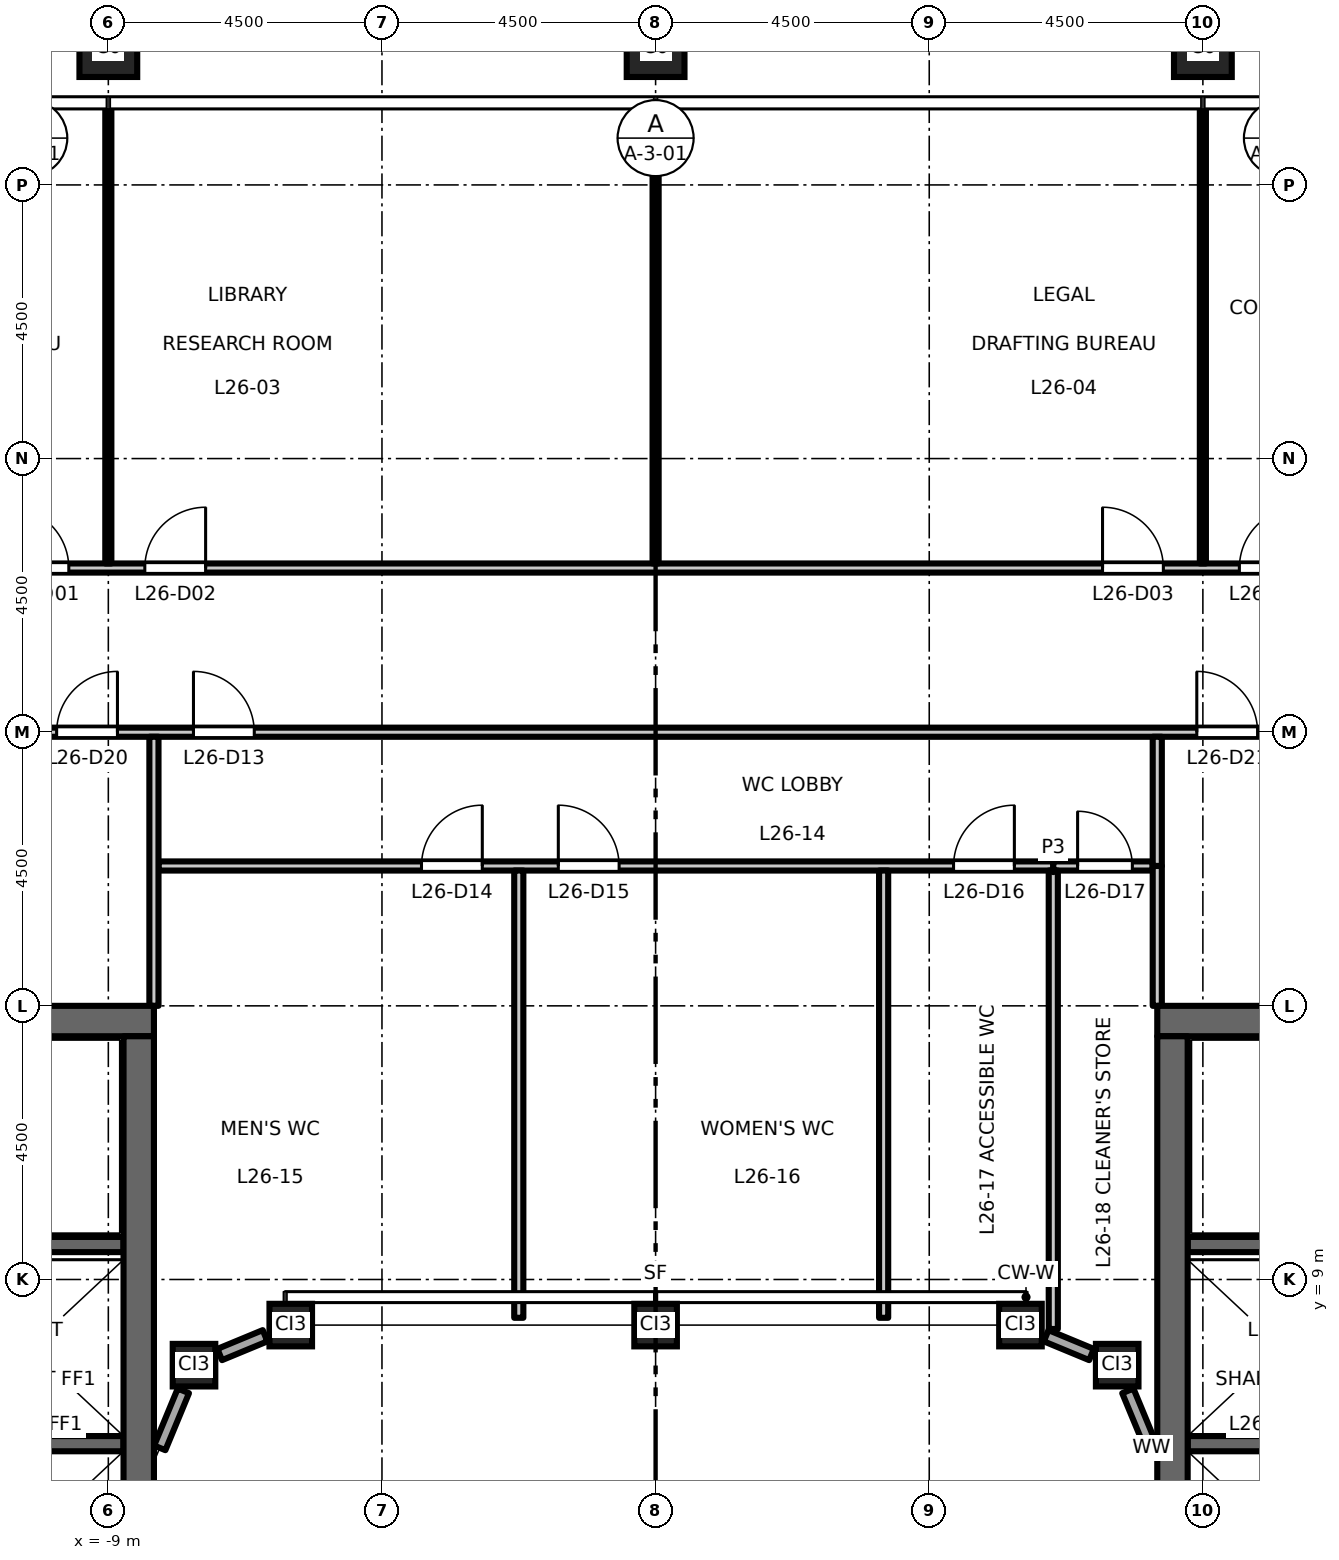
"""IFC4 building model, lengths in metres.
Left out: names, types, materials, properties, quantities, classifications, styles, units other than length and angle.
Written with IfcOpenShell. Run it as: python <this file> out.ifc"""

import sys

from ifc_helpers import new_model, si_unit, direction, frame, frame_2d, origin, origin_2d, place, context, subcontext, project, spatial, rectangle, hollow_rectangle, extrude, element, fill, save


model = new_model("IFC4")
c1 = context("Model", 3, precision=1e-05, world=origin(), true_north=direction((0.0, 1.0)))
c2 = subcontext(c1, "Body", "Model", "MODEL_VIEW")
j1 = project(units=[si_unit("LENGTHUNIT", "METRE"), si_unit("PLANEANGLEUNIT", "RADIAN")], contexts=[c1])
p1 = place(None, origin())
s1 = spatial("IfcSite", under=j1, at=p1, CompositionType="ELEMENT")
p2 = place(p1, origin())
s2 = spatial("IfcBuilding", under=s1, at=p2, CompositionType="ELEMENT")
p3 = place(p2, frame((0.0, 0.0, 122.7)))
s3 = spatial("IfcBuildingStorey", under=s2, at=p3, CompositionType="ELEMENT", Elevation=122.7)
for number, where, z_axis, x_axis in (
    (1, (9.0, 29.25, 0.0), (0.0, 0.0, 1.0), (1.0, 0.0, 0.0)),
    (2, (0.0, 29.25, 0.0), (0.0, 0.0, 1.0), (1.0, 0.0, 0.0)),
    (3, (-9.0, 29.25, 0.0), (0.0, 0.0, 1.0), (1.0, 0.0, 0.0)),
):
    element("IfcColumn", number, at=place(p3, frame(where, z_axis=z_axis, x_axis=x_axis)), inside=s3, PredefinedType="COLUMN", context=c2, shape_type="SweptSolid", body=[
        extrude(hollow_rectangle(XDim=0.95, YDim=0.95, WallThickness=0.055, at=origin_2d()), origin(), (0.0, 0.0, 1.0), 4.5),
    ])
for number, where, z_axis, x_axis in (
    (4, (-7.591, 7.591, 0.0), (0.0, 0.0, 1.0), (1.0, 0.0, 0.0)),
    (5, (-6.0, 8.25, 0.0), (0.0, 0.0, 1.0), (1.0, 0.0, 0.0)),
    (6, (0.0, 8.25, 0.0), (0.0, 0.0, 1.0), (1.0, 0.0, 0.0)),
    (7, (6.0, 8.25, 0.0), (0.0, 0.0, 1.0), (1.0, 0.0, 0.0)),
    (8, (7.591, 7.591, 0.0), (0.0, 0.0, 1.0), (1.0, 0.0, 0.0)),
):
    element("IfcColumn", number, at=place(p3, frame(where, z_axis=z_axis, x_axis=x_axis)), inside=s3, PredefinedType="COLUMN", context=c2, shape_type="SweptSolid", body=[
        extrude(hollow_rectangle(XDim=0.7, YDim=0.7, WallThickness=0.04, at=origin_2d()), origin(), (0.0, 0.0, 1.0), 4.5),
    ])
p4 = place(p3, frame((-8.75, 6.3, 0.0), z_axis=(0.0, 0.0, 1.0), x_axis=(-1.0, 0.0, 0.0)))
e9 = element("IfcWall", 9, at=p4, inside=s3, PredefinedType="SHEAR", context=c2, shape_type="SweptSolid", body=[
    extrude(rectangle(XDim=3.1, YDim=0.25, at=frame_2d((1.55, 0.0))), origin(), (0.0, 0.0, 1.0), 4.35),
])
p5 = place(p3, frame((-8.75, 9.575, 0.0), z_axis=(0.0, 0.0, 1.0), x_axis=(-1.0, 0.0, 0.0)))
e10 = element("IfcWall", 10, at=p5, inside=s3, PredefinedType="SHEAR", context=c2, shape_type="SweptSolid", body=[
    extrude(rectangle(XDim=8.0, YDim=0.25, at=frame_2d((4.0, 0.0))), origin(), (0.0, 0.0, 1.0), 4.35),
])
p6 = place(p5, frame((6.65, 0.0, 0.0)))
e11 = element("IfcOpeningElement", 11, at=p6, cuts=e10, PredefinedType="OPENING", context=c2, shape_type="SweptSolid", body=[
    extrude(rectangle(XDim=1.1, YDim=2.1, at=frame_2d((0.55, 1.05))), frame((0.0, 0.135, 0.0), z_axis=(0.0, -1.0, 0.0), x_axis=(1.0, 0.0, 0.0)), (0.0, 0.0, 1.0), 0.27),
])
p7 = place(p3, frame((-8.25, 13.25, 0.0), z_axis=(0.0, 0.0, 1.0), x_axis=(-1.0, 0.0, 0.0)))
e12 = element("IfcWall", 12, at=p7, inside=s3, PredefinedType="SHEAR", context=c2, shape_type="SweptSolid", body=[
    extrude(rectangle(XDim=13.5, YDim=0.5, at=frame_2d((6.75, 0.0))), origin(), (0.0, 0.0, 1.0), 4.35),
])
p8 = place(p3, frame((-8.5, -13.0, 0.0), z_axis=(0.0, 0.0, 1.0), x_axis=(0.0, 1.0, 0.0)))
e13 = element("IfcWall", 13, at=p8, inside=s3, PredefinedType="SHEAR", context=c2, shape_type="SweptSolid", body=[
    extrude(rectangle(XDim=26.0, YDim=0.5, at=frame_2d((13.0, 0.0))), origin(), (0.0, 0.0, 1.0), 4.35),
])
p9 = place(p3, frame((8.75, 6.3, 0.0), z_axis=(0.0, 0.0, 1.0), x_axis=(1.0, 0.0, 0.0)))
e14 = element("IfcWall", 14, at=p9, inside=s3, PredefinedType="SHEAR", context=c2, shape_type="SweptSolid", body=[
    extrude(rectangle(XDim=3.1, YDim=0.25, at=frame_2d((1.55, 0.0))), origin(), (0.0, 0.0, 1.0), 4.35),
])
p10 = place(p3, frame((8.75, 9.575, 0.0), z_axis=(0.0, 0.0, 1.0), x_axis=(1.0, 0.0, 0.0)))
e15 = element("IfcWall", 15, at=p10, inside=s3, PredefinedType="SHEAR", context=c2, shape_type="SweptSolid", body=[
    extrude(rectangle(XDim=8.0, YDim=0.25, at=frame_2d((4.0, 0.0))), origin(), (0.0, 0.0, 1.0), 4.35),
])
p11 = place(p10, frame((6.65, 0.0, 0.0)))
e16 = element("IfcOpeningElement", 16, at=p11, cuts=e15, PredefinedType="OPENING", context=c2, shape_type="SweptSolid", body=[
    extrude(rectangle(XDim=1.1, YDim=2.1, at=frame_2d((0.55, 1.05))), frame((0.0, 0.135, 0.0), z_axis=(0.0, -1.0, 0.0), x_axis=(1.0, 0.0, 0.0)), (0.0, 0.0, 1.0), 0.27),
])
p12 = place(p3, frame((8.25, 13.25, 0.0), z_axis=(0.0, 0.0, 1.0), x_axis=(1.0, 0.0, 0.0)))
e17 = element("IfcWall", 17, at=p12, inside=s3, PredefinedType="SHEAR", context=c2, shape_type="SweptSolid", body=[
    extrude(rectangle(XDim=13.5, YDim=0.5, at=frame_2d((6.75, 0.0))), origin(), (0.0, 0.0, 1.0), 4.35),
])
p13 = place(p3, frame((8.5, -13.0, 0.0), z_axis=(0.0, 0.0, 1.0), x_axis=(0.0, 1.0, 0.0)))
e18 = element("IfcWall", 18, at=p13, inside=s3, PredefinedType="SHEAR", context=c2, shape_type="SweptSolid", body=[
    extrude(rectangle(XDim=26.0, YDim=0.5, at=frame_2d((13.0, 0.0))), origin(), (0.0, 0.0, 1.0), 4.35),
])
p14 = place(p3, frame((8.154, 6.231, 0.0), z_axis=(0.0, 0.0, 1.0), x_axis=(-0.382769662028, 0.923843810301, 0.0)))
e19 = element("IfcWall", 19, at=p14, inside=s3, PredefinedType="STANDARD", context=c2, shape_type="SweptSolid", body=[
    extrude(rectangle(XDim=1.015, YDim=0.2, at=frame_2d((0.507, 0.0))), origin(), (0.0, 0.0, 1.0), 3.826),
])
for number, where, z_axis, x_axis in (
    (20, (7.168, 7.766, 0.0), (0.0, 0.0, 1.0), (-0.924, 0.383, 0.0)),
    (21, (-6.423, 8.075, 0.0), (0.0, 0.0, 1.0), (-0.924, -0.383, 0.0)),
):
    element("IfcWall", number, at=place(p3, frame(where, z_axis=z_axis, x_axis=x_axis)), inside=s3, PredefinedType="STANDARD", context=c2, shape_type="SweptSolid", body=[
        extrude(rectangle(XDim=0.807, YDim=0.2, at=frame_2d((0.404, 0.0))), origin(), (0.0, 0.0, 1.0), 3.826),
    ])
p15 = place(p3, frame((-7.766, 7.168, 0.0), z_axis=(0.0, 0.0, 1.0), x_axis=(-0.382769662028, -0.923843810301, 0.0)))
e22 = element("IfcWall", 22, at=p15, inside=s3, PredefinedType="STANDARD", context=c2, shape_type="SweptSolid", body=[
    extrude(rectangle(XDim=1.015, YDim=0.2, at=frame_2d((0.507, 0.0))), origin(), (0.0, 0.0, 1.0), 3.826),
])
p16 = place(p3, frame((-8.175, 15.8, 0.0), z_axis=(0.0, 0.0, 1.0), x_axis=(1.0, 0.0, 0.0)))
e23 = element("IfcWall", 23, at=p16, inside=s3, PredefinedType="PARTITIONING", context=c2, shape_type="SweptSolid", body=[
    extrude(rectangle(XDim=14.715, YDim=0.15, at=frame_2d((7.357, 0.0))), origin(), (0.0, 0.0, 1.0), 4.35),
])
p17 = place(p16, frame((4.325, 0.0, 0.0)))
e24 = element("IfcOpeningElement", 24, at=p17, cuts=e23, PredefinedType="OPENING", context=c2, shape_type="SweptSolid", body=[
    extrude(rectangle(XDim=1.0, YDim=2.1, at=frame_2d((0.5, 1.05))), frame((0.0, 0.085, 0.0), z_axis=(0.0, -1.0, 0.0), x_axis=(1.0, 0.0, 0.0)), (0.0, 0.0, 1.0), 0.17),
])
p18 = place(p16, frame((6.575, 0.0, 0.0)))
e25 = element("IfcOpeningElement", 25, at=p18, cuts=e23, PredefinedType="OPENING", context=c2, shape_type="SweptSolid", body=[
    extrude(rectangle(XDim=1.0, YDim=2.1, at=frame_2d((0.5, 1.05))), frame((0.0, 0.085, 0.0), z_axis=(0.0, -1.0, 0.0), x_axis=(1.0, 0.0, 0.0)), (0.0, 0.0, 1.0), 0.17),
])
p19 = place(p16, frame((13.075, 0.0, 0.0)))
e26 = element("IfcOpeningElement", 26, at=p19, cuts=e23, PredefinedType="OPENING", context=c2, shape_type="SweptSolid", body=[
    extrude(rectangle(XDim=1.0, YDim=2.1, at=frame_2d((0.5, 1.05))), frame((0.0, 0.085, 0.0), z_axis=(0.0, -1.0, 0.0), x_axis=(1.0, 0.0, 0.0)), (0.0, 0.0, 1.0), 0.17),
])
p20 = place(p3, frame((6.54, 15.8, 0.0), z_axis=(0.0, 0.0, 1.0), x_axis=(1.0, 0.0, 0.0)))
e27 = element("IfcWall", 27, at=p20, inside=s3, PredefinedType="PARTITIONING", context=c2, shape_type="SweptSolid", body=[
    extrude(rectangle(XDim=1.635, YDim=0.15, at=frame_2d((0.817, 0.0))), origin(), (0.0, 0.0, 1.0), 4.35),
])
p21 = place(p20, frame((0.4, 0.0, 0.0)))
e28 = element("IfcOpeningElement", 28, at=p21, cuts=e27, PredefinedType="OPENING", context=c2, shape_type="SweptSolid", body=[
    extrude(rectangle(XDim=0.9, YDim=2.1, at=frame_2d((0.45, 1.05))), frame((0.0, 0.085, 0.0), z_axis=(0.0, -1.0, 0.0), x_axis=(1.0, 0.0, 0.0)), (0.0, 0.0, 1.0), 0.17),
])
p22 = place(p3, frame((-21.825, 18.0, 0.0), z_axis=(0.0, 0.0, 1.0), x_axis=(1.0, 0.0, 0.0)))
e29 = element("IfcWall", 29, at=p22, inside=s3, PredefinedType="PARTITIONING", context=c2, shape_type="SweptSolid", body=[
    extrude(rectangle(XDim=43.65, YDim=0.15, at=frame_2d((21.825, 0.0))), origin(), (0.0, 0.0, 1.0), 4.35),
])
p23 = place(p22, frame((14.225, 0.0, 0.0)))
e30 = element("IfcOpeningElement", 30, at=p23, cuts=e29, PredefinedType="OPENING", context=c2, shape_type="SweptSolid", body=[
    extrude(rectangle(XDim=1.0, YDim=2.1, at=frame_2d((0.5, 1.05))), frame((0.0, 0.085, 0.0), z_axis=(0.0, -1.0, 0.0), x_axis=(1.0, 0.0, 0.0)), (0.0, 0.0, 1.0), 0.17),
])
p24 = place(p22, frame((11.975, 0.0, 0.0)))
e31 = element("IfcOpeningElement", 31, at=p24, cuts=e29, PredefinedType="OPENING", context=c2, shape_type="SweptSolid", body=[
    extrude(rectangle(XDim=1.0, YDim=2.1, at=frame_2d((0.5, 1.05))), frame((0.0, 0.085, 0.0), z_axis=(0.0, -1.0, 0.0), x_axis=(1.0, 0.0, 0.0)), (0.0, 0.0, 1.0), 0.17),
])
p25 = place(p22, frame((30.725, 0.0, 0.0)))
e32 = element("IfcOpeningElement", 32, at=p25, cuts=e29, PredefinedType="OPENING", context=c2, shape_type="SweptSolid", body=[
    extrude(rectangle(XDim=1.0, YDim=2.1, at=frame_2d((0.5, 1.05))), frame((0.0, 0.085, 0.0), z_axis=(0.0, -1.0, 0.0), x_axis=(1.0, 0.0, 0.0)), (0.0, 0.0, 1.0), 0.17),
])
p26 = place(p3, frame((-27.06, 20.7, 0.0), z_axis=(0.0, 0.0, 1.0), x_axis=(1.0, 0.0, 0.0)))
e33 = element("IfcWall", 33, at=p26, inside=s3, PredefinedType="PARTITIONING", context=c2, shape_type="SweptSolid", body=[
    extrude(rectangle(XDim=54.12, YDim=0.15, at=frame_2d((27.06, 0.0))), origin(), (0.0, 0.0, 1.0), 4.35),
])
p27 = place(p26, frame((16.41, 0.0, 0.0)))
e34 = element("IfcOpeningElement", 34, at=p27, cuts=e33, PredefinedType="OPENING", context=c2, shape_type="SweptSolid", body=[
    extrude(rectangle(XDim=1.0, YDim=2.1, at=frame_2d((0.5, 1.05))), frame((0.0, 0.085, 0.0), z_axis=(0.0, -1.0, 0.0), x_axis=(1.0, 0.0, 0.0)), (0.0, 0.0, 1.0), 0.17),
])
p28 = place(p26, frame((18.66, 0.0, 0.0)))
e35 = element("IfcOpeningElement", 35, at=p28, cuts=e33, PredefinedType="OPENING", context=c2, shape_type="SweptSolid", body=[
    extrude(rectangle(XDim=1.0, YDim=2.1, at=frame_2d((0.5, 1.05))), frame((0.0, 0.085, 0.0), z_axis=(0.0, -1.0, 0.0), x_axis=(1.0, 0.0, 0.0)), (0.0, 0.0, 1.0), 0.17),
])
p29 = place(p26, frame((34.41, 0.0, 0.0)))
e36 = element("IfcOpeningElement", 36, at=p29, cuts=e33, PredefinedType="OPENING", context=c2, shape_type="SweptSolid", body=[
    extrude(rectangle(XDim=1.0, YDim=2.1, at=frame_2d((0.5, 1.05))), frame((0.0, 0.085, 0.0), z_axis=(0.0, -1.0, 0.0), x_axis=(1.0, 0.0, 0.0)), (0.0, 0.0, 1.0), 0.17),
])
p30 = place(p26, frame((36.66, 0.0, 0.0)))
e37 = element("IfcOpeningElement", 37, at=p30, cuts=e33, PredefinedType="OPENING", context=c2, shape_type="SweptSolid", body=[
    extrude(rectangle(XDim=1.0, YDim=2.1, at=frame_2d((0.5, 1.05))), frame((0.0, 0.085, 0.0), z_axis=(0.0, -1.0, 0.0), x_axis=(1.0, 0.0, 0.0)), (0.0, 0.0, 1.0), 0.17),
])
p31 = place(p26, frame((7.41, 0.0, 0.0)))
e38 = element("IfcOpeningElement", 38, at=p31, cuts=e33, PredefinedType="OPENING", context=c2, shape_type="SweptSolid", body=[
    extrude(rectangle(XDim=1.0, YDim=2.1, at=frame_2d((0.5, 1.05))), frame((0.0, 0.085, 0.0), z_axis=(0.0, -1.0, 0.0), x_axis=(1.0, 0.0, 0.0)), (0.0, 0.0, 1.0), 0.17),
])
p32 = place(p26, frame((45.72, 0.0, 0.0)))
e39 = element("IfcOpeningElement", 39, at=p32, cuts=e33, PredefinedType="OPENING", context=c2, shape_type="SweptSolid", body=[
    extrude(rectangle(XDim=1.0, YDim=2.1, at=frame_2d((0.5, 1.05))), frame((0.0, 0.085, 0.0), z_axis=(0.0, -1.0, 0.0), x_axis=(1.0, 0.0, 0.0)), (0.0, 0.0, 1.0), 0.17),
])
p33 = place(p3, frame((-9.0, 20.775, 0.0), z_axis=(0.0, 0.0, 1.0), x_axis=(0.0, 1.0, 0.0)))
e40 = element("IfcWall", 40, at=p33, inside=s3, PredefinedType="PARTITIONING", context=c2, shape_type="SweptSolid", body=[
    extrude(rectangle(XDim=7.485, YDim=0.1, at=frame_2d((3.743, 0.0))), origin(), (0.0, 0.0, 1.0), 3.45),
])
p34 = place(p3, frame((-8.25, 13.5, 0.0), z_axis=(0.0, 0.0, 1.0), x_axis=(0.0, 1.0, 0.0)))
e41 = element("IfcWall", 41, at=p34, inside=s3, PredefinedType="PARTITIONING", context=c2, shape_type="SweptSolid", body=[
    extrude(rectangle(XDim=4.425, YDim=0.15, at=frame_2d((2.212, 0.0))), origin(), (0.0, 0.0, 1.0), 4.35),
])
p35 = place(p3, frame((-2.25, 8.37, 0.0), z_axis=(0.0, 0.0, 1.0), x_axis=(0.0, 1.0, 0.0)))
e42 = element("IfcWall", 42, at=p35, inside=s3, PredefinedType="PARTITIONING", context=c2, shape_type="SweptSolid", body=[
    extrude(rectangle(XDim=7.355, YDim=0.15, at=frame_2d((3.677, 0.0))), origin(), (0.0, 0.0, 1.0), 4.35),
])
p36 = place(p3, frame((0.0, 20.775, 0.0), z_axis=(0.0, 0.0, 1.0), x_axis=(0.0, 1.0, 0.0)))
e43 = element("IfcWall", 43, at=p36, inside=s3, PredefinedType="PARTITIONING", context=c2, shape_type="SweptSolid", body=[
    extrude(rectangle(XDim=7.485, YDim=0.1, at=frame_2d((3.743, 0.0))), origin(), (0.0, 0.0, 1.0), 3.45),
])
p37 = place(p3, frame((3.75, 8.37, 0.0), z_axis=(0.0, 0.0, 1.0), x_axis=(0.0, 1.0, 0.0)))
e44 = element("IfcWall", 44, at=p37, inside=s3, PredefinedType="PARTITIONING", context=c2, shape_type="SweptSolid", body=[
    extrude(rectangle(XDim=7.355, YDim=0.15, at=frame_2d((3.677, 0.0))), origin(), (0.0, 0.0, 1.0), 4.35),
])
p38 = place(p3, frame((6.54, 8.186, 0.0), z_axis=(0.0, 0.0, 1.0), x_axis=(0.0, 1.0, 0.0)))
e45 = element("IfcWall", 45, at=p38, inside=s3, PredefinedType="PARTITIONING", context=c2, shape_type="SweptSolid", body=[
    extrude(rectangle(XDim=7.539, YDim=0.15, at=frame_2d((3.77, 0.0))), origin(), (0.0, 0.0, 1.0), 4.35),
])
p39 = place(p3, frame((8.25, 15.8, 0.0), z_axis=(0.0, 0.0, 1.0), x_axis=(0.0, 1.0, 0.0)))
e46 = element("IfcWall", 46, at=p39, inside=s3, PredefinedType="PARTITIONING", context=c2, shape_type="SweptSolid", body=[
    extrude(rectangle(XDim=2.125, YDim=0.15, at=frame_2d((1.062, 0.0))), origin(), (0.0, 0.0, 1.0), 4.35),
])
p40 = place(p3, frame((8.25, 13.5, 0.0), z_axis=(0.0, 0.0, 1.0), x_axis=(0.0, 1.0, 0.0)))
e47 = element("IfcWall", 47, at=p40, inside=s3, PredefinedType="PARTITIONING", context=c2, shape_type="SweptSolid", body=[
    extrude(rectangle(XDim=2.3, YDim=0.15, at=frame_2d((1.15, 0.0))), origin(), (0.0, 0.0, 1.0), 4.35),
])
p41 = place(p3, frame((9.0, 20.775, 0.0), z_axis=(0.0, 0.0, 1.0), x_axis=(0.0, 1.0, 0.0)))
e48 = element("IfcWall", 48, at=p41, inside=s3, PredefinedType="PARTITIONING", context=c2, shape_type="SweptSolid", body=[
    extrude(rectangle(XDim=7.485, YDim=0.1, at=frame_2d((3.743, 0.0))), origin(), (0.0, 0.0, 1.0), 3.45),
])
p42 = place(p27, origin())
e49 = element("IfcDoor", 49, at=p42, inside=s3, OperationType="SINGLE_SWING_LEFT", PredefinedType="DOOR", context=c2, shape_type="SweptSolid", body=[
    extrude(rectangle(XDim=1.0, YDim=2.1, at=frame_2d((0.5, 1.05))), frame((0.0, 0.025, 0.0), z_axis=(0.0, -1.0, 0.0), x_axis=(1.0, 0.0, 0.0)), (0.0, 0.0, 1.0), 0.05),
])
fill(e34, e49)
p43 = place(p28, origin())
e50 = element("IfcDoor", 50, at=p43, inside=s3, OperationType="SINGLE_SWING_RIGHT", PredefinedType="DOOR", context=c2, shape_type="SweptSolid", body=[
    extrude(rectangle(XDim=1.0, YDim=2.1, at=frame_2d((0.5, 1.05))), frame((0.0, 0.025, 0.0), z_axis=(0.0, -1.0, 0.0), x_axis=(1.0, 0.0, 0.0)), (0.0, 0.0, 1.0), 0.05),
])
fill(e35, e50)
p44 = place(p29, origin())
e51 = element("IfcDoor", 51, at=p44, inside=s3, OperationType="SINGLE_SWING_LEFT", PredefinedType="DOOR", context=c2, shape_type="SweptSolid", body=[
    extrude(rectangle(XDim=1.0, YDim=2.1, at=frame_2d((0.5, 1.05))), frame((0.0, 0.025, 0.0), z_axis=(0.0, -1.0, 0.0), x_axis=(1.0, 0.0, 0.0)), (0.0, 0.0, 1.0), 0.05),
])
fill(e36, e51)
p45 = place(p30, origin())
e52 = element("IfcDoor", 52, at=p45, inside=s3, OperationType="SINGLE_SWING_RIGHT", PredefinedType="DOOR", context=c2, shape_type="SweptSolid", body=[
    extrude(rectangle(XDim=1.0, YDim=2.1, at=frame_2d((0.5, 1.05))), frame((0.0, 0.025, 0.0), z_axis=(0.0, -1.0, 0.0), x_axis=(1.0, 0.0, 0.0)), (0.0, 0.0, 1.0), 0.05),
])
fill(e37, e52)
p46 = place(p23, origin())
e53 = element("IfcDoor", 53, at=p46, inside=s3, OperationType="SINGLE_SWING_LEFT", PredefinedType="DOOR", context=c2, shape_type="SweptSolid", body=[
    extrude(rectangle(XDim=1.0, YDim=2.1, at=frame_2d((0.5, 1.05))), frame((0.0, 0.025, 0.0), z_axis=(0.0, -1.0, 0.0), x_axis=(1.0, 0.0, 0.0)), (0.0, 0.0, 1.0), 0.05),
])
fill(e30, e53)
p47 = place(p17, origin())
e54 = element("IfcDoor", 54, at=p47, inside=s3, OperationType="SINGLE_SWING_RIGHT", PredefinedType="DOOR", context=c2, shape_type="SweptSolid", body=[
    extrude(rectangle(XDim=1.0, YDim=2.1, at=frame_2d((0.5, 1.05))), frame((0.0, 0.025, 0.0), z_axis=(0.0, -1.0, 0.0), x_axis=(1.0, 0.0, 0.0)), (0.0, 0.0, 1.0), 0.05),
])
fill(e24, e54)
p48 = place(p18, origin())
e55 = element("IfcDoor", 55, at=p48, inside=s3, OperationType="SINGLE_SWING_LEFT", PredefinedType="DOOR", context=c2, shape_type="SweptSolid", body=[
    extrude(rectangle(XDim=1.0, YDim=2.1, at=frame_2d((0.5, 1.05))), frame((0.0, 0.025, 0.0), z_axis=(0.0, -1.0, 0.0), x_axis=(1.0, 0.0, 0.0)), (0.0, 0.0, 1.0), 0.05),
])
fill(e25, e55)
p49 = place(p19, origin())
e56 = element("IfcDoor", 56, at=p49, inside=s3, OperationType="SINGLE_SWING_RIGHT", PredefinedType="DOOR", context=c2, shape_type="SweptSolid", body=[
    extrude(rectangle(XDim=1.0, YDim=2.1, at=frame_2d((0.5, 1.05))), frame((0.0, 0.025, 0.0), z_axis=(0.0, -1.0, 0.0), x_axis=(1.0, 0.0, 0.0)), (0.0, 0.0, 1.0), 0.05),
])
fill(e26, e56)
p50 = place(p21, origin())
e57 = element("IfcDoor", 57, at=p50, inside=s3, OperationType="SINGLE_SWING_LEFT", PredefinedType="DOOR", context=c2, shape_type="SweptSolid", body=[
    extrude(rectangle(XDim=0.9, YDim=2.1, at=frame_2d((0.45, 1.05))), frame((0.0, 0.025, 0.0), z_axis=(0.0, -1.0, 0.0), x_axis=(1.0, 0.0, 0.0)), (0.0, 0.0, 1.0), 0.05),
])
fill(e28, e57)
p51 = place(p24, origin())
e58 = element("IfcDoor", 58, at=p51, inside=s3, OperationType="SINGLE_SWING_RIGHT", PredefinedType="DOOR", context=c2, shape_type="SweptSolid", body=[
    extrude(rectangle(XDim=1.0, YDim=2.1, at=frame_2d((0.5, 1.05))), frame((0.0, 0.025, 0.0), z_axis=(0.0, -1.0, 0.0), x_axis=(1.0, 0.0, 0.0)), (0.0, 0.0, 1.0), 0.05),
])
fill(e31, e58)
p52 = place(p25, origin())
e59 = element("IfcDoor", 59, at=p52, inside=s3, OperationType="SINGLE_SWING_LEFT", PredefinedType="DOOR", context=c2, shape_type="SweptSolid", body=[
    extrude(rectangle(XDim=1.0, YDim=2.1, at=frame_2d((0.5, 1.05))), frame((0.0, 0.025, 0.0), z_axis=(0.0, -1.0, 0.0), x_axis=(1.0, 0.0, 0.0)), (0.0, 0.0, 1.0), 0.05),
])
fill(e32, e59)
save(model, sys.argv[1])
